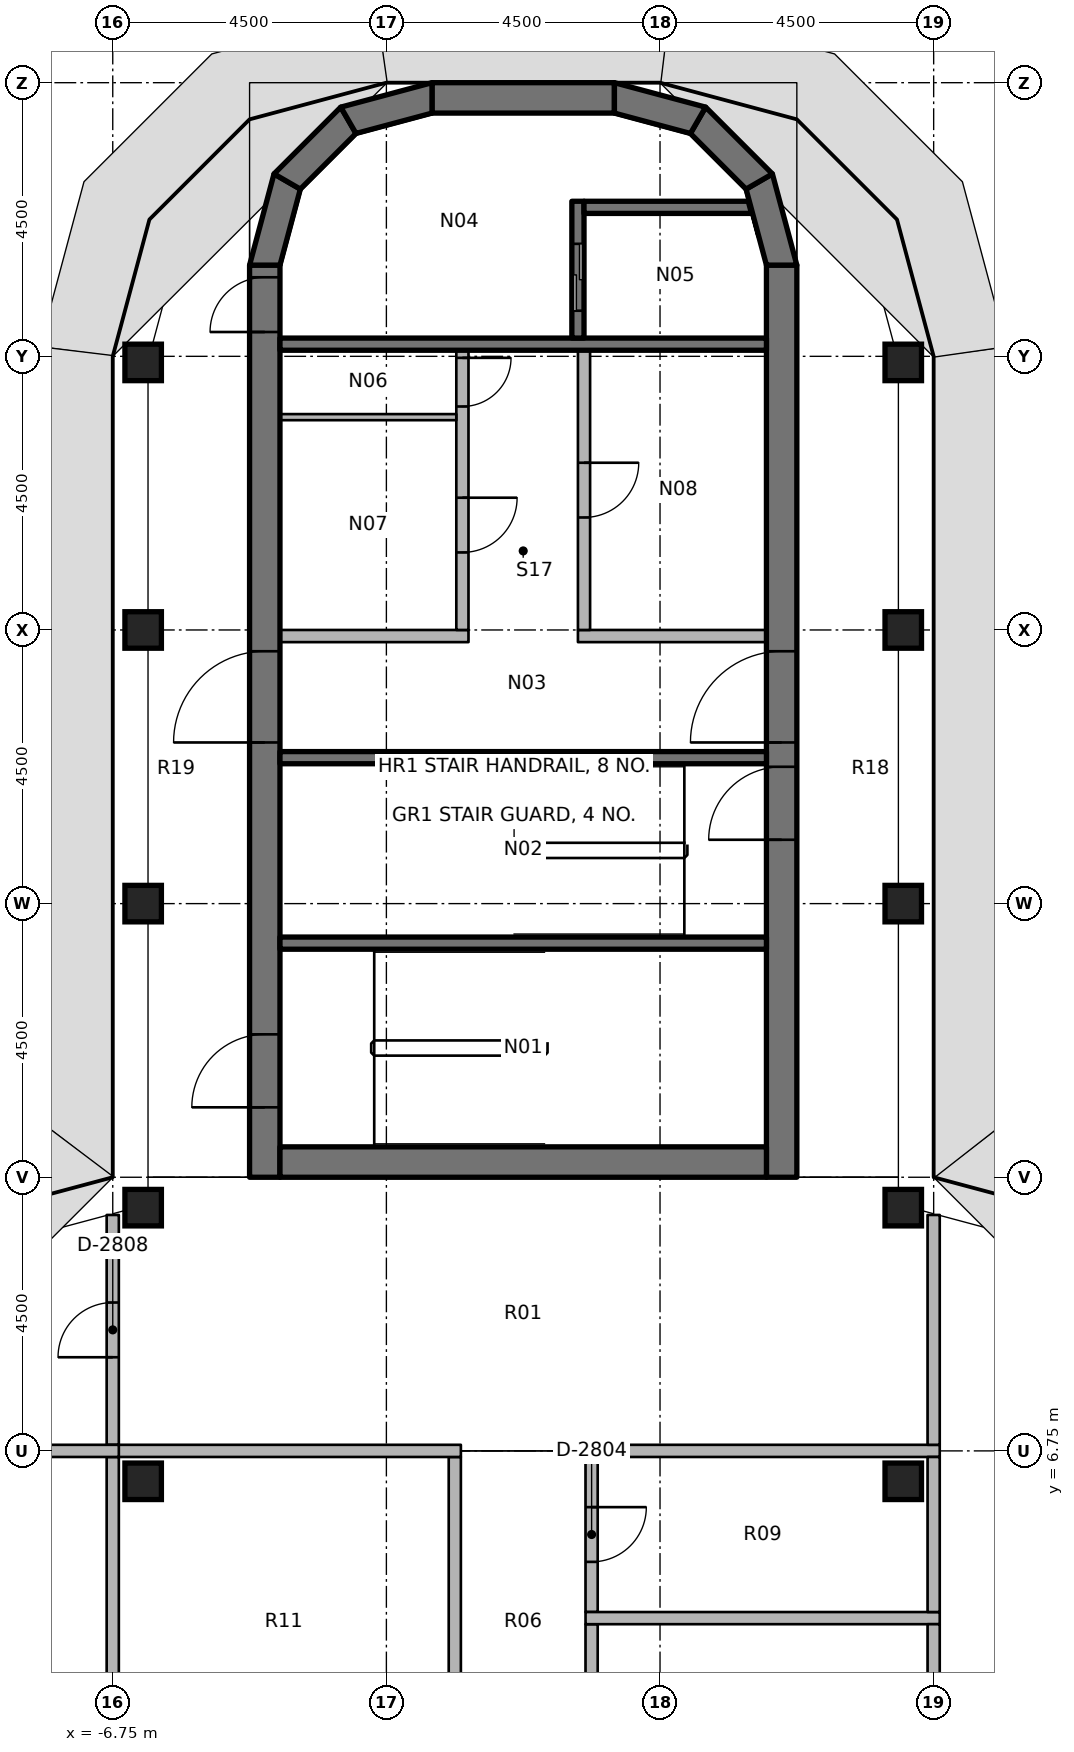
"""IFC4 building model, lengths in metres.
Left out: names, types, materials, properties, quantities, classifications, styles, units other than length and angle.
Written with IfcOpenShell. Run it as: python <this file> out.ifc"""

import sys

from ifc_helpers import new_model, si_unit, direction, frame, frame_2d, origin, origin_2d, place, context, subcontext, project, spatial, polyline, rectangle, outline, extrude, element, fill, save


model = new_model("IFC4")
c1 = context("Model", 3, precision=1e-05, world=origin(), true_north=direction((0.0, 1.0)))
c2 = subcontext(c1, "Body", "Model", "MODEL_VIEW")
j1 = project(units=[si_unit("LENGTHUNIT", "METRE"), si_unit("PLANEANGLEUNIT", "RADIAN")], contexts=[c1])
p1 = place(None, origin())
s1 = spatial("IfcSite", under=j1, at=p1, CompositionType="ELEMENT")
p2 = place(p1, origin())
s2 = spatial("IfcBuilding", under=s1, at=p2, CompositionType="ELEMENT")
p3 = place(p2, frame((0.0, 0.0, 265.0)))
s3 = spatial("IfcBuildingStorey", under=s2, at=p3, CompositionType="ELEMENT", Elevation=265.0)
for number, where, z_axis, x_axis in (
    (1, (-6.25, 6.25, 0.0), (0.0, 0.0, 1.0), (1.0, 0.0, 0.0)),
    (2, (-6.25, 10.75, 0.0), (0.0, 0.0, 1.0), (1.0, 0.0, 0.0)),
    (3, (-6.25, 15.75, 0.0), (0.0, 0.0, 1.0), (1.0, 0.0, 0.0)),
    (4, (-6.25, 20.25, 0.0), (0.0, 0.0, 1.0), (1.0, 0.0, 0.0)),
    (5, (-6.25, 24.65, 0.0), (0.0, 0.0, 1.0), (1.0, 0.0, 0.0)),
    (6, (6.25, 6.25, 0.0), (0.0, 0.0, 1.0), (1.0, 0.0, 0.0)),
    (7, (6.25, 10.75, 0.0), (0.0, 0.0, 1.0), (1.0, 0.0, 0.0)),
    (8, (6.25, 15.75, 0.0), (0.0, 0.0, 1.0), (1.0, 0.0, 0.0)),
    (9, (6.25, 20.25, 0.0), (0.0, 0.0, 1.0), (1.0, 0.0, 0.0)),
    (10, (6.25, 24.65, 0.0), (0.0, 0.0, 1.0), (1.0, 0.0, 0.0)),
):
    element("IfcColumn", number, at=place(p3, frame(where, z_axis=z_axis, x_axis=x_axis)), inside=s3, PredefinedType="COLUMN", context=c2, shape_type="SweptSolid", body=[
        extrude(rectangle(XDim=0.6, YDim=0.6, at=origin_2d()), origin(), (0.0, 0.0, 1.0), 3.65),
    ])
p4 = place(p3, frame((-4.25, 11.25, 0.0), z_axis=(0.0, 0.0, 1.0), x_axis=(0.0, 1.0, 0.0)))
e11 = element("IfcWall", 11, at=p4, inside=s3, PredefinedType="SHEAR", context=c2, shape_type="SweptSolid", body=[
    extrude(rectangle(XDim=15.0, YDim=0.5, at=frame_2d((7.5, 0.0))), origin(), (0.0, 0.0, 1.0), 3.8),
])
p5 = place(p4, frame((7.15, 0.0, 0.0)))
e12 = element("IfcOpeningElement", 12, at=p5, cuts=e11, PredefinedType="OPENING", context=c2, shape_type="SweptSolid", body=[
    extrude(rectangle(XDim=1.5, YDim=2.3, at=frame_2d((0.75, 1.15))), frame((0.0, 0.26, 0.0), z_axis=(0.0, -1.0, 0.0), x_axis=(1.0, 0.0, 0.0)), (0.0, 0.0, 1.0), 0.52),
])
p6 = place(p4, frame((13.9, 0.0, 0.0)))
e13 = element("IfcOpeningElement", 13, at=p6, cuts=e11, PredefinedType="OPENING", context=c2, shape_type="SweptSolid", body=[
    extrude(rectangle(XDim=0.9, YDim=2.1, at=frame_2d((0.45, 1.05))), frame((0.0, 0.26, 0.0), z_axis=(0.0, -1.0, 0.0), x_axis=(1.0, 0.0, 0.0)), (0.0, 0.0, 1.0), 0.52),
])
p7 = place(p4, frame((1.15, 0.0, 0.0)))
e14 = element("IfcOpeningElement", 14, at=p7, cuts=e11, PredefinedType="OPENING", context=c2, shape_type="SweptSolid", body=[
    extrude(rectangle(XDim=1.2, YDim=2.1, at=frame_2d((0.6, 1.05))), frame((0.0, 0.26, 0.0), z_axis=(0.0, -1.0, 0.0), x_axis=(1.0, 0.0, 0.0)), (0.0, 0.0, 1.0), 0.52),
])
p8 = place(p3, frame((4.25, 11.25, 0.0), z_axis=(0.0, 0.0, 1.0), x_axis=(0.0, 1.0, 0.0)))
e15 = element("IfcWall", 15, at=p8, inside=s3, PredefinedType="SHEAR", context=c2, shape_type="SweptSolid", body=[
    extrude(rectangle(XDim=15.0, YDim=0.5, at=frame_2d((7.5, 0.0))), origin(), (0.0, 0.0, 1.0), 3.8),
])
p9 = place(p8, frame((7.15, 0.0, 0.0)))
e16 = element("IfcOpeningElement", 16, at=p9, cuts=e15, PredefinedType="OPENING", context=c2, shape_type="SweptSolid", body=[
    extrude(rectangle(XDim=1.5, YDim=2.3, at=frame_2d((0.75, 1.15))), frame((0.0, 0.26, 0.0), z_axis=(0.0, -1.0, 0.0), x_axis=(1.0, 0.0, 0.0)), (0.0, 0.0, 1.0), 0.52),
])
p10 = place(p8, frame((5.55, 0.0, 0.0)))
e17 = element("IfcOpeningElement", 17, at=p10, cuts=e15, PredefinedType="OPENING", context=c2, shape_type="SweptSolid", body=[
    extrude(rectangle(XDim=1.2, YDim=2.1, at=frame_2d((0.6, 1.05))), frame((0.0, 0.26, 0.0), z_axis=(0.0, -1.0, 0.0), x_axis=(1.0, 0.0, 0.0)), (0.0, 0.0, 1.0), 0.52),
])
p11 = place(p3, frame((-4.0, 11.5, 0.0), z_axis=(0.0, 0.0, 1.0), x_axis=(1.0, 0.0, 0.0)))
e18 = element("IfcWall", 18, at=p11, inside=s3, PredefinedType="SHEAR", context=c2, shape_type="SweptSolid", body=[
    extrude(rectangle(XDim=8.0, YDim=0.5, at=frame_2d((4.0, 0.0))), origin(), (0.0, 0.0, 1.0), 3.8),
])
p12 = place(p3, frame((-1.5, 29.0, 0.0), z_axis=(0.0, 0.0, 1.0), x_axis=(1.0, 0.0, 0.0)))
e19 = element("IfcWall", 19, at=p12, inside=s3, PredefinedType="SHEAR", context=c2, shape_type="SweptSolid", body=[
    extrude(rectangle(XDim=3.0, YDim=0.5, at=frame_2d((1.5, 0.0))), origin(), (0.0, 0.0, 1.0), 3.8),
])
p13 = place(p3, origin())
e20 = element("IfcWall", 20, at=p13, inside=s3, PredefinedType="SHEAR", context=c2, shape_type="SweptSolid", body=[
    extrude(outline(polyline([(-4.5, 26.25), (-4.098, 27.75), (-3.665, 27.5), (-4.0, 26.25), (-4.5, 26.25)])), origin(), (0.0, 0.0, 1.0), 3.8),
])
p14 = place(p3, origin())
e21 = element("IfcWall", 21, at=p14, inside=s3, PredefinedType="SHEAR", context=c2, shape_type="SweptSolid", body=[
    extrude(outline(polyline([(-4.098, 27.75), (-3.0, 28.848), (-2.75, 28.415), (-3.665, 27.5), (-4.098, 27.75)])), origin(), (0.0, 0.0, 1.0), 3.8),
])
p15 = place(p3, origin())
e22 = element("IfcWall", 22, at=p15, inside=s3, PredefinedType="SHEAR", context=c2, shape_type="SweptSolid", body=[
    extrude(outline(polyline([(-3.0, 28.848), (-1.5, 29.25), (-1.5, 28.75), (-2.75, 28.415), (-3.0, 28.848)])), origin(), (0.0, 0.0, 1.0), 3.8),
])
p16 = place(p3, origin())
e23 = element("IfcWall", 23, at=p16, inside=s3, PredefinedType="SHEAR", context=c2, shape_type="SweptSolid", body=[
    extrude(outline(polyline([(4.5, 26.25), (4.098, 27.75), (3.665, 27.5), (4.0, 26.25), (4.5, 26.25)])), origin(), (0.0, 0.0, 1.0), 3.8),
])
p17 = place(p3, origin())
e24 = element("IfcWall", 24, at=p17, inside=s3, PredefinedType="SHEAR", context=c2, shape_type="SweptSolid", body=[
    extrude(outline(polyline([(4.098, 27.75), (3.0, 28.848), (2.75, 28.415), (3.665, 27.5), (4.098, 27.75)])), origin(), (0.0, 0.0, 1.0), 3.8),
])
p18 = place(p3, origin())
e25 = element("IfcWall", 25, at=p18, inside=s3, PredefinedType="SHEAR", context=c2, shape_type="SweptSolid", body=[
    extrude(outline(polyline([(3.0, 28.848), (1.5, 29.25), (1.5, 28.75), (2.75, 28.415), (3.0, 28.848)])), origin(), (0.0, 0.0, 1.0), 3.8),
])
p19 = place(p3, frame((-4.0, 24.95, 0.0), z_axis=(0.0, 0.0, 1.0), x_axis=(1.0, 0.0, 0.0)))
e26 = element("IfcWall", 26, at=p19, inside=s3, PredefinedType="SHEAR", context=c2, shape_type="SweptSolid", body=[
    extrude(rectangle(XDim=8.0, YDim=0.2, at=frame_2d((4.0, 0.0))), origin(), (0.0, 0.0, 1.0), 3.65),
])
p20 = place(p3, frame((0.9, 27.3, 0.0), z_axis=(0.0, 0.0, 1.0), x_axis=(0.0, -1.0, 0.0)))
e27 = element("IfcWall", 27, at=p20, inside=s3, PredefinedType="SHEAR", context=c2, shape_type="SweptSolid", body=[
    extrude(rectangle(XDim=2.25, YDim=0.2, at=frame_2d((1.125, 0.0))), origin(), (0.0, 0.0, 1.0), 3.65),
])
p21 = place(p20, frame((0.7, 0.0, 0.0)))
e28 = element("IfcOpeningElement", 28, at=p21, cuts=e27, PredefinedType="OPENING", context=c2, shape_type="SweptSolid", body=[
    extrude(rectangle(XDim=1.1, YDim=2.3, at=frame_2d((0.55, 1.15))), frame((0.0, 0.11, 0.0), z_axis=(0.0, -1.0, 0.0), x_axis=(1.0, 0.0, 0.0)), (0.0, 0.0, 1.0), 0.22),
])
p22 = place(p3, origin())
e29 = element("IfcWall", 29, at=p22, inside=s3, PredefinedType="SHEAR", context=c2, shape_type="SweptSolid", body=[
    extrude(outline(polyline([(1.0, 27.1), (3.755, 27.1), (3.701, 27.3), (1.0, 27.3), (1.0, 27.1)])), origin(), (0.0, 0.0, 1.0), 3.65),
])
for number, where, z_axis, x_axis in (
    (30, (-4.0, 18.15, 0.0), (0.0, 0.0, 1.0), (1.0, 0.0, 0.0)),
    (31, (-4.0, 15.1, 0.0), (0.0, 0.0, 1.0), (1.0, 0.0, 0.0)),
):
    element("IfcWall", number, at=place(p3, frame(where, z_axis=z_axis, x_axis=x_axis)), inside=s3, PredefinedType="SHEAR", context=c2, shape_type="SweptSolid", body=[
        extrude(rectangle(XDim=8.0, YDim=0.2, at=frame_2d((4.0, 0.0))), origin(), (0.0, 0.0, 1.0), 3.65),
    ])
p23 = place(p3, frame((-4.0, 20.15, 0.0), z_axis=(0.0, 0.0, 1.0), x_axis=(1.0, 0.0, 0.0)))
e32 = element("IfcWall", 32, at=p23, inside=s3, PredefinedType="PARTITIONING", context=c2, shape_type="SweptSolid", body=[
    extrude(rectangle(XDim=3.1, YDim=0.2, at=frame_2d((1.55, 0.0))), origin(), (0.0, 0.0, 1.0), 3.65),
])
p24 = place(p3, frame((-1.0, 24.85, 0.0), z_axis=(0.0, 0.0, 1.0), x_axis=(0.0, -1.0, 0.0)))
e33 = element("IfcWall", 33, at=p24, inside=s3, PredefinedType="PARTITIONING", context=c2, shape_type="SweptSolid", body=[
    extrude(rectangle(XDim=4.6, YDim=0.2, at=frame_2d((2.3, 0.0))), origin(), (0.0, 0.0, 1.0), 3.65),
])
p25 = place(p24, frame((0.125, 0.0, 0.0)))
e34 = element("IfcOpeningElement", 34, at=p25, cuts=e33, PredefinedType="OPENING", context=c2, shape_type="SweptSolid", body=[
    extrude(rectangle(XDim=0.8, YDim=2.1, at=frame_2d((0.4, 1.05))), frame((0.0, 0.11, 0.0), z_axis=(0.0, -1.0, 0.0), x_axis=(1.0, 0.0, 0.0)), (0.0, 0.0, 1.0), 0.22),
])
p26 = place(p24, frame((2.425, 0.0, 0.0)))
e35 = element("IfcOpeningElement", 35, at=p26, cuts=e33, PredefinedType="OPENING", context=c2, shape_type="SweptSolid", body=[
    extrude(rectangle(XDim=0.9, YDim=2.1, at=frame_2d((0.45, 1.05))), frame((0.0, 0.11, 0.0), z_axis=(0.0, -1.0, 0.0), x_axis=(1.0, 0.0, 0.0)), (0.0, 0.0, 1.0), 0.22),
])
p27 = place(p3, frame((0.9, 20.15, 0.0), z_axis=(0.0, 0.0, 1.0), x_axis=(1.0, 0.0, 0.0)))
e36 = element("IfcWall", 36, at=p27, inside=s3, PredefinedType="PARTITIONING", context=c2, shape_type="SweptSolid", body=[
    extrude(rectangle(XDim=3.1, YDim=0.2, at=frame_2d((1.55, 0.0))), origin(), (0.0, 0.0, 1.0), 3.65),
])
p28 = place(p3, frame((1.0, 24.85, 0.0), z_axis=(0.0, 0.0, 1.0), x_axis=(0.0, -1.0, 0.0)))
e37 = element("IfcWall", 37, at=p28, inside=s3, PredefinedType="PARTITIONING", context=c2, shape_type="SweptSolid", body=[
    extrude(rectangle(XDim=4.6, YDim=0.2, at=frame_2d((2.3, 0.0))), origin(), (0.0, 0.0, 1.0), 3.65),
])
p29 = place(p28, frame((1.85, 0.0, 0.0)))
e38 = element("IfcOpeningElement", 38, at=p29, cuts=e37, PredefinedType="OPENING", context=c2, shape_type="SweptSolid", body=[
    extrude(rectangle(XDim=0.9, YDim=2.1, at=frame_2d((0.45, 1.05))), frame((0.0, 0.11, 0.0), z_axis=(0.0, -1.0, 0.0), x_axis=(1.0, 0.0, 0.0)), (0.0, 0.0, 1.0), 0.22),
])
p30 = place(p3, frame((-4.0, 23.75, 0.0), z_axis=(0.0, 0.0, 1.0), x_axis=(1.0, 0.0, 0.0)))
e39 = element("IfcWall", 39, at=p30, inside=s3, PredefinedType="PARTITIONING", context=c2, shape_type="SweptSolid", body=[
    extrude(rectangle(XDim=2.9, YDim=0.1, at=frame_2d((1.45, 0.0))), origin(), (0.0, 0.0, 1.0), 3.65),
])
p31 = place(p3, frame((1.125, 1.225, 0.0), z_axis=(0.0, 0.0, 1.0), x_axis=(0.0, 1.0, 0.0)))
e40 = element("IfcWall", 40, at=p31, inside=s3, PredefinedType="PARTITIONING", context=c2, shape_type="SweptSolid", body=[
    extrude(rectangle(XDim=2.675, YDim=0.2, at=frame_2d((1.337, 0.0))), origin(), (0.0, 0.0, 1.0), 2.75),
])
p32 = place(p3, frame((1.125, 6.65, 0.0), z_axis=(0.0, 0.0, 1.0), x_axis=(0.0, -1.0, 0.0)))
e41 = element("IfcWall", 41, at=p32, inside=s3, PredefinedType="PARTITIONING", context=c2, shape_type="SweptSolid", body=[
    extrude(rectangle(XDim=2.55, YDim=0.2, at=frame_2d((1.275, 0.0))), origin(), (0.0, 0.0, 1.0), 2.75),
])
p33 = place(p32, frame((0.825, 0.0, 0.0)))
e42 = element("IfcOpeningElement", 42, at=p33, cuts=e41, PredefinedType="OPENING", context=c2, shape_type="SweptSolid", body=[
    extrude(rectangle(XDim=0.9, YDim=2.1, at=frame_2d((0.45, 1.05))), frame((0.0, 0.11, 0.0), z_axis=(0.0, -1.0, 0.0), x_axis=(1.0, 0.0, 0.0)), (0.0, 0.0, 1.0), 0.22),
])
p34 = place(p3, frame((-1.125, 1.225, 0.0), z_axis=(0.0, 0.0, 1.0), x_axis=(0.0, 1.0, 0.0)))
e43 = element("IfcWall", 43, at=p34, inside=s3, PredefinedType="PARTITIONING", context=c2, shape_type="SweptSolid", body=[
    extrude(rectangle(XDim=5.425, YDim=0.2, at=frame_2d((2.712, 0.0))), origin(), (0.0, 0.0, 1.0), 2.75),
])
p35 = place(p3, frame((1.025, 6.75, 0.0), z_axis=(0.0, 0.0, 1.0), x_axis=(1.0, 0.0, 0.0)))
e44 = element("IfcWall", 44, at=p35, inside=s3, PredefinedType="PARTITIONING", context=c2, shape_type="SweptSolid", body=[
    extrude(rectangle(XDim=5.825, YDim=0.2, at=frame_2d((2.913, 0.0))), origin(), (0.0, 0.0, 1.0), 2.75),
])
p36 = place(p3, frame((6.75, 6.85, 0.0), z_axis=(0.0, 0.0, 1.0), x_axis=(0.0, 1.0, 0.0)))
e45 = element("IfcWall", 45, at=p36, inside=s3, PredefinedType="PARTITIONING", context=c2, shape_type="SweptSolid", body=[
    extrude(rectangle(XDim=3.78, YDim=0.2, at=frame_2d((1.89, 0.0))), origin(), (0.0, 0.0, 1.0), 2.75),
])
p37 = place(p3, frame((-6.85, 6.75, 0.0), z_axis=(0.0, 0.0, 1.0), x_axis=(1.0, 0.0, 0.0)))
e46 = element("IfcWall", 46, at=p37, inside=s3, PredefinedType="PARTITIONING", context=c2, shape_type="SweptSolid", body=[
    extrude(rectangle(XDim=5.825, YDim=0.2, at=frame_2d((2.913, 0.0))), origin(), (0.0, 0.0, 1.0), 2.75),
])
p38 = place(p3, frame((-6.75, 6.85, 0.0), z_axis=(0.0, 0.0, 1.0), x_axis=(0.0, 1.0, 0.0)))
e47 = element("IfcWall", 47, at=p38, inside=s3, PredefinedType="PARTITIONING", context=c2, shape_type="SweptSolid", body=[
    extrude(rectangle(XDim=3.78, YDim=0.2, at=frame_2d((1.89, 0.0))), origin(), (0.0, 0.0, 1.0), 2.75),
])
p39 = place(p38, frame((1.44, 0.0, 0.0)))
e48 = element("IfcOpeningElement", 48, at=p39, cuts=e47, PredefinedType="OPENING", context=c2, shape_type="SweptSolid", body=[
    extrude(rectangle(XDim=0.9, YDim=2.1, at=frame_2d((0.45, 1.05))), frame((0.0, 0.11, 0.0), z_axis=(0.0, -1.0, 0.0), x_axis=(1.0, 0.0, 0.0)), (0.0, 0.0, 1.0), 0.22),
])
p40 = place(p3, frame((1.025, 4.0, 0.0), z_axis=(0.0, 0.0, 1.0), x_axis=(1.0, 0.0, 0.0)))
e49 = element("IfcWall", 49, at=p40, inside=s3, PredefinedType="PARTITIONING", context=c2, shape_type="SweptSolid", body=[
    extrude(rectangle(XDim=5.825, YDim=0.2, at=frame_2d((2.913, 0.0))), origin(), (0.0, 0.0, 1.0), 2.75),
])
p41 = place(p3, frame((6.75, 1.225, 0.0), z_axis=(0.0, 0.0, 1.0), x_axis=(0.0, 1.0, 0.0)))
e50 = element("IfcWall", 50, at=p41, inside=s3, PredefinedType="PARTITIONING", context=c2, shape_type="SweptSolid", body=[
    extrude(rectangle(XDim=2.675, YDim=0.2, at=frame_2d((1.337, 0.0))), origin(), (0.0, 0.0, 1.0), 2.75),
])
p42 = place(p3, frame((6.75, 4.1, 0.0), z_axis=(0.0, 0.0, 1.0), x_axis=(0.0, 1.0, 0.0)))
e51 = element("IfcWall", 51, at=p42, inside=s3, PredefinedType="PARTITIONING", context=c2, shape_type="SweptSolid", body=[
    extrude(rectangle(XDim=2.55, YDim=0.2, at=frame_2d((1.275, 0.0))), origin(), (0.0, 0.0, 1.0), 2.75),
])
p43 = place(p3, frame((-6.75, 1.225, 0.0), z_axis=(0.0, 0.0, 1.0), x_axis=(0.0, 1.0, 0.0)))
e52 = element("IfcWall", 52, at=p43, inside=s3, PredefinedType="PARTITIONING", context=c2, shape_type="SweptSolid", body=[
    extrude(rectangle(XDim=5.425, YDim=0.2, at=frame_2d((2.712, 0.0))), origin(), (0.0, 0.0, 1.0), 2.75),
])
p44 = place(p3, frame((-11.35, 6.75, 0.0), z_axis=(0.0, 0.0, 1.0), x_axis=(1.0, 0.0, 0.0)))
e53 = element("IfcWall", 53, at=p44, inside=s3, PredefinedType="PARTITIONING", context=c2, shape_type="SweptSolid", body=[
    extrude(rectangle(XDim=4.7, YDim=0.2, at=frame_2d((2.35, 0.0))), origin(), (0.0, 0.0, 1.0), 2.75),
])
p45 = place(p5, origin())
e54 = element("IfcDoor", 54, at=p45, inside=s3, OperationType="DOUBLE_DOOR_SINGLE_SWING", PredefinedType="DOOR", context=c2, shape_type="SweptSolid", body=[
    extrude(rectangle(XDim=1.5, YDim=2.3, at=frame_2d((0.75, 1.15))), frame((0.0, 0.025, 0.0), z_axis=(0.0, -1.0, 0.0), x_axis=(1.0, 0.0, 0.0)), (0.0, 0.0, 1.0), 0.05),
])
fill(e12, e54)
p46 = place(p9, origin())
e55 = element("IfcDoor", 55, at=p46, inside=s3, OperationType="DOUBLE_DOOR_SINGLE_SWING", PredefinedType="DOOR", context=c2, shape_type="SweptSolid", body=[
    extrude(rectangle(XDim=1.5, YDim=2.3, at=frame_2d((0.75, 1.15))), frame((0.0, 0.025, 0.0), z_axis=(0.0, -1.0, 0.0), x_axis=(1.0, 0.0, 0.0)), (0.0, 0.0, 1.0), 0.05),
])
fill(e16, e55)
p47 = place(p6, origin())
e56 = element("IfcDoor", 56, at=p47, inside=s3, OperationType="SINGLE_SWING_RIGHT", PredefinedType="DOOR", context=c2, shape_type="SweptSolid", body=[
    extrude(rectangle(XDim=0.9, YDim=2.1, at=frame_2d((0.45, 1.05))), frame((0.0, 0.025, 0.0), z_axis=(0.0, -1.0, 0.0), x_axis=(1.0, 0.0, 0.0)), (0.0, 0.0, 1.0), 0.05),
])
fill(e13, e56)
p48 = place(p10, origin())
e57 = element("IfcDoor", 57, at=p48, inside=s3, OperationType="SINGLE_SWING_RIGHT", PredefinedType="DOOR", context=c2, shape_type="SweptSolid", body=[
    extrude(rectangle(XDim=1.2, YDim=2.1, at=frame_2d((0.6, 1.05))), frame((0.0, 0.025, 0.0), z_axis=(0.0, -1.0, 0.0), x_axis=(1.0, 0.0, 0.0)), (0.0, 0.0, 1.0), 0.05),
])
fill(e17, e57)
p49 = place(p7, origin())
e58 = element("IfcDoor", 58, at=p49, inside=s3, OperationType="SINGLE_SWING_LEFT", PredefinedType="DOOR", context=c2, shape_type="SweptSolid", body=[
    extrude(rectangle(XDim=1.2, YDim=2.1, at=frame_2d((0.6, 1.05))), frame((0.0, 0.025, 0.0), z_axis=(0.0, -1.0, 0.0), x_axis=(1.0, 0.0, 0.0)), (0.0, 0.0, 1.0), 0.05),
])
fill(e14, e58)
p50 = place(p21, origin())
e59 = element("IfcDoor", 59, at=p50, inside=s3, OperationType="DOUBLE_DOOR_SLIDING", PredefinedType="DOOR", context=c2, shape_type="SweptSolid", body=[
    extrude(rectangle(XDim=1.1, YDim=2.3, at=frame_2d((0.55, 1.15))), frame((0.0, 0.025, 0.0), z_axis=(0.0, -1.0, 0.0), x_axis=(1.0, 0.0, 0.0)), (0.0, 0.0, 1.0), 0.05),
])
fill(e28, e59)
p51 = place(p25, origin())
e60 = element("IfcDoor", 60, at=p51, inside=s3, OperationType="SINGLE_SWING_RIGHT", PredefinedType="DOOR", context=c2, shape_type="SweptSolid", body=[
    extrude(rectangle(XDim=0.8, YDim=2.1, at=frame_2d((0.4, 1.05))), frame((0.0, 0.025, 0.0), z_axis=(0.0, -1.0, 0.0), x_axis=(1.0, 0.0, 0.0)), (0.0, 0.0, 1.0), 0.05),
])
fill(e34, e60)
p52 = place(p26, origin())
e61 = element("IfcDoor", 61, at=p52, inside=s3, OperationType="SINGLE_SWING_LEFT", PredefinedType="DOOR", context=c2, shape_type="SweptSolid", body=[
    extrude(rectangle(XDim=0.9, YDim=2.1, at=frame_2d((0.45, 1.05))), frame((0.0, 0.025, 0.0), z_axis=(0.0, -1.0, 0.0), x_axis=(1.0, 0.0, 0.0)), (0.0, 0.0, 1.0), 0.05),
])
fill(e35, e61)
p53 = place(p29, origin())
e62 = element("IfcDoor", 62, at=p53, inside=s3, OperationType="SINGLE_SWING_LEFT", PredefinedType="DOOR", context=c2, shape_type="SweptSolid", body=[
    extrude(rectangle(XDim=0.9, YDim=2.1, at=frame_2d((0.45, 1.05))), frame((0.0, 0.025, 0.0), z_axis=(0.0, -1.0, 0.0), x_axis=(1.0, 0.0, 0.0)), (0.0, 0.0, 1.0), 0.05),
])
fill(e38, e62)
p54 = place(p33, origin())
e63 = element("IfcDoor", 63, at=p54, inside=s3, OperationType="SINGLE_SWING_RIGHT", PredefinedType="DOOR", context=c2, shape_type="SweptSolid", body=[
    extrude(rectangle(XDim=0.9, YDim=2.1, at=frame_2d((0.45, 1.05))), frame((0.0, 0.025, 0.0), z_axis=(0.0, -1.0, 0.0), x_axis=(1.0, 0.0, 0.0)), (0.0, 0.0, 1.0), 0.05),
])
fill(e42, e63)
p55 = place(p39, origin())
e64 = element("IfcDoor", 64, at=p55, inside=s3, OperationType="SINGLE_SWING_LEFT", PredefinedType="DOOR", context=c2, shape_type="SweptSolid", body=[
    extrude(rectangle(XDim=0.9, YDim=2.1, at=frame_2d((0.45, 1.05))), frame((0.0, 0.025, 0.0), z_axis=(0.0, -1.0, 0.0), x_axis=(1.0, 0.0, 0.0)), (0.0, 0.0, 1.0), 0.05),
])
fill(e48, e64)
save(model, sys.argv[1])
